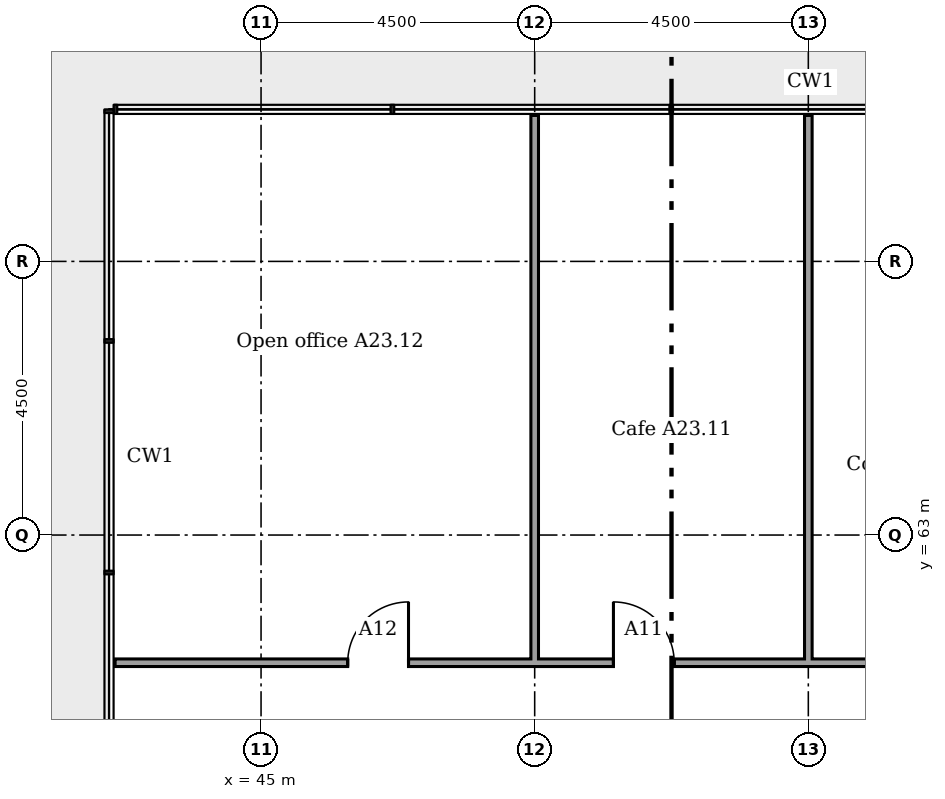
"""IFC4 building model, lengths in metres.
Left out: names, types, materials, properties, quantities, classifications, styles, units other than length and angle.
Written with IfcOpenShell. Run it as: python <this file> out.ifc"""

import sys

from ifc_helpers import new_model, si_unit, direction, frame, frame_2d, origin, place, context, subcontext, project, spatial, rectangle, extrude, element, fill, save


model = new_model("IFC4")
c1 = context("Model", 3, precision=1e-05, world=origin(), true_north=direction((0.0, 1.0)))
c2 = subcontext(c1, "Body", "Model", "MODEL_VIEW")
j1 = project(units=[si_unit("LENGTHUNIT", "METRE"), si_unit("PLANEANGLEUNIT", "RADIAN")], contexts=[c1])
p1 = place(None, origin())
s1 = spatial("IfcSite", under=j1, at=p1, CompositionType="ELEMENT")
p2 = place(p1, origin())
s2 = spatial("IfcBuilding", under=s1, at=p2, CompositionType="ELEMENT")
p3 = place(p2, frame((0.0, 0.0, 95.6)))
s3 = spatial("IfcBuildingStorey", under=s2, at=p3, CompositionType="ELEMENT", Elevation=95.6)
p4 = place(p3, frame((42.6, 60.9, 0.0)))
e1 = element("IfcWall", 1, at=p4, inside=s3, PredefinedType="PARTITIONING", context=c2, shape_type="SweptSolid", body=[
    extrude(rectangle(XDim=18.662, YDim=0.125, at=frame_2d((9.331, 0.0))), origin(), (0.0, 0.0, 1.0), 3.45),
])
p5 = place(p4, frame((16.35, 0.0, 0.0)))
e2 = element("IfcOpeningElement", 2, at=p5, cuts=e1, PredefinedType="OPENING", context=c2, shape_type="SweptSolid", body=[
    extrude(rectangle(XDim=1.8, YDim=2.1, at=frame_2d((0.9, 1.05))), frame((0.0, 0.073, 0.0), z_axis=(0.0, -1.0, 0.0), x_axis=(1.0, 0.0, 0.0)), (0.0, 0.0, 1.0), 0.145),
])
p6 = place(p4, frame((13.15, 0.0, 0.0)))
e3 = element("IfcOpeningElement", 3, at=p6, cuts=e1, PredefinedType="OPENING", context=c2, shape_type="SweptSolid", body=[
    extrude(rectangle(XDim=1.0, YDim=2.1, at=frame_2d((0.5, 1.05))), frame((0.0, 0.073, 0.0), z_axis=(0.0, -1.0, 0.0), x_axis=(1.0, 0.0, 0.0)), (0.0, 0.0, 1.0), 0.145),
])
p7 = place(p4, frame((8.195, 0.0, 0.0)))
e4 = element("IfcOpeningElement", 4, at=p7, cuts=e1, PredefinedType="OPENING", context=c2, shape_type="SweptSolid", body=[
    extrude(rectangle(XDim=1.0, YDim=2.1, at=frame_2d((0.5, 1.05))), frame((0.0, 0.073, 0.0), z_axis=(0.0, -1.0, 0.0), x_axis=(1.0, 0.0, 0.0)), (0.0, 0.0, 1.0), 0.145),
])
p8 = place(p4, frame((3.825, 0.0, 0.0)))
e5 = element("IfcOpeningElement", 5, at=p8, cuts=e1, PredefinedType="OPENING", context=c2, shape_type="SweptSolid", body=[
    extrude(rectangle(XDim=1.0, YDim=2.1, at=frame_2d((0.5, 1.05))), frame((0.0, 0.073, 0.0), z_axis=(0.0, -1.0, 0.0), x_axis=(1.0, 0.0, 0.0)), (0.0, 0.0, 1.0), 0.145),
])
for number, where, z_axis, x_axis in (
    (6, (49.5, 60.9, 0.0), (0.0, 0.0, 1.0), (0.0, 1.0, 0.0)),
    (7, (54.0, 60.9, 0.0), (0.0, 0.0, 1.0), (0.0, 1.0, 0.0)),
):
    element("IfcWall", number, at=place(p3, frame(where, z_axis=z_axis, x_axis=x_axis)), inside=s3, PredefinedType="PARTITIONING", context=c2, shape_type="SweptSolid", body=[
        extrude(rectangle(XDim=9.0, YDim=0.125, at=frame_2d((4.5, 0.0))), origin(), (0.0, 0.0, 1.0), 2.766),
    ])
p9 = place(p7, origin())
e8 = element("IfcDoor", 8, at=p9, inside=s3, OperationType="SINGLE_SWING_RIGHT", PredefinedType="DOOR", context=c2, shape_type="SweptSolid", body=[
    extrude(rectangle(XDim=1.0, YDim=2.1, at=frame_2d((0.5, 1.05))), frame((0.0, 0.025, 0.0), z_axis=(0.0, -1.0, 0.0), x_axis=(1.0, 0.0, 0.0)), (0.0, 0.0, 1.0), 0.05),
])
fill(e4, e8)
p10 = place(p8, origin())
e9 = element("IfcDoor", 9, at=p10, inside=s3, OperationType="SINGLE_SWING_LEFT", PredefinedType="DOOR", context=c2, shape_type="SweptSolid", body=[
    extrude(rectangle(XDim=1.0, YDim=2.1, at=frame_2d((0.5, 1.05))), frame((0.0, 0.025, 0.0), z_axis=(0.0, -1.0, 0.0), x_axis=(1.0, 0.0, 0.0)), (0.0, 0.0, 1.0), 0.05),
])
fill(e5, e9)
save(model, sys.argv[1])
